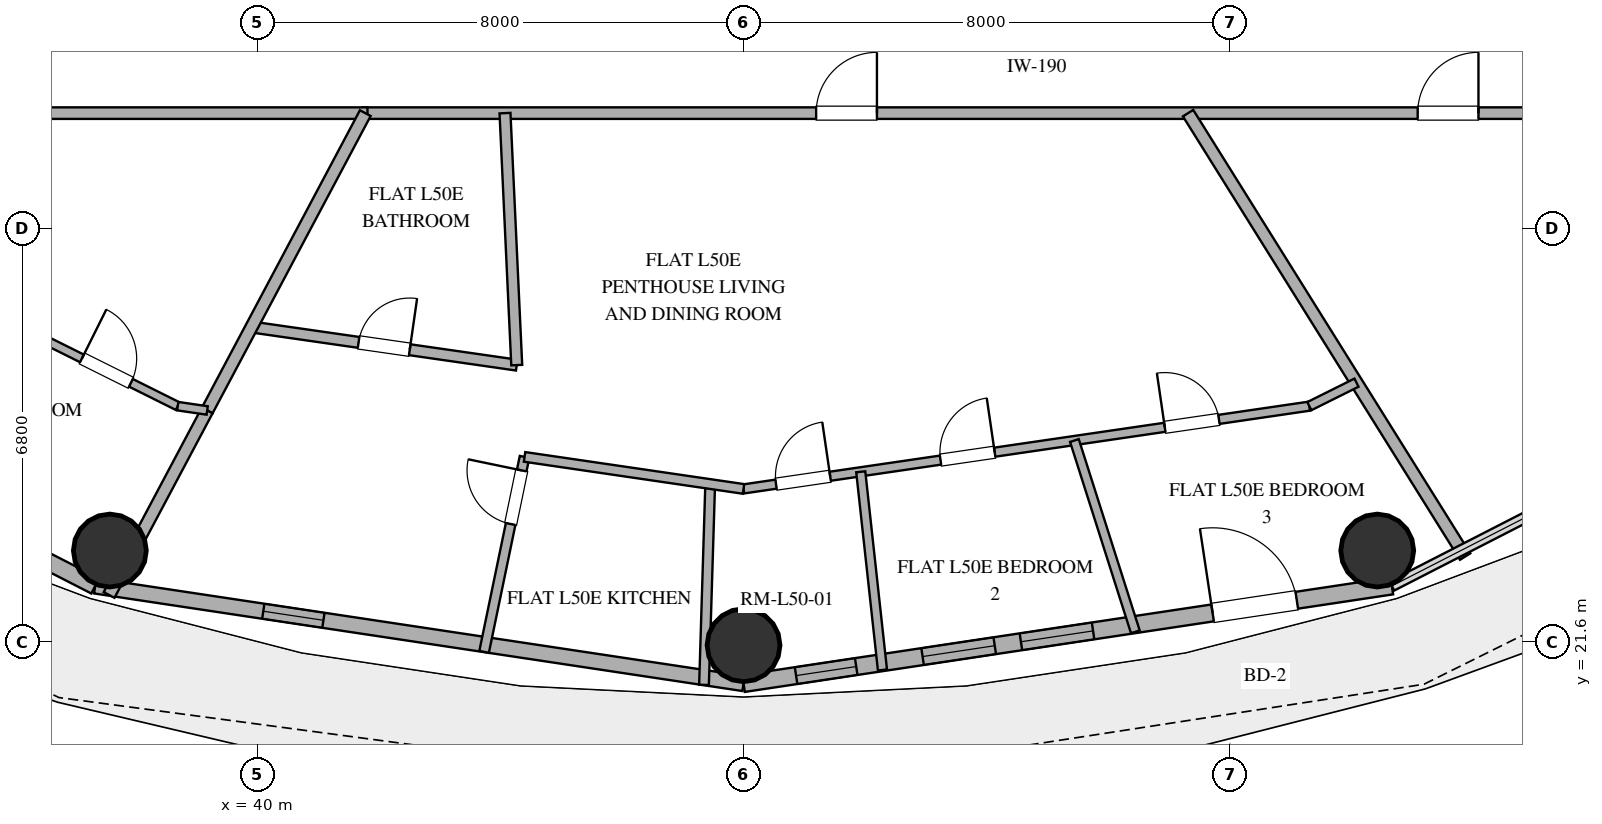
"""IFC4 building model, lengths in metres.
Left out: names, types, materials, properties, quantities, classifications, styles, units other than length and angle.
Written with IfcOpenShell. Run it as: python <this file> out.ifc"""

import sys

from ifc_helpers import new_model, si_unit, direction, frame, frame_2d, origin, origin_2d, place, context, subcontext, project, spatial, rectangle, hollow_circle, extrude, element, fill, save


model = new_model("IFC4")
c1 = context("Model", 3, precision=1e-05, world=origin(), true_north=direction((0.0, 1.0)))
c2 = subcontext(c1, "Body", "Model", "MODEL_VIEW")
j1 = project(units=[si_unit("LENGTHUNIT", "METRE"), si_unit("PLANEANGLEUNIT", "RADIAN")], contexts=[c1])
p1 = place(None, origin())
s1 = spatial("IfcSite", under=j1, at=p1, CompositionType="ELEMENT")
p2 = place(p1, origin())
s2 = spatial("IfcBuilding", under=s1, at=p2, CompositionType="ELEMENT")
p3 = place(p2, frame((0.0, 0.0, 197.4)))
s3 = spatial("IfcBuildingStorey", under=s2, at=p3, CompositionType="ELEMENT", Elevation=197.4)
for number, where, z_axis, x_axis in (
    (1, (37.578, 23.107, 0.0), (0.0, 0.0, 1.0), (1.0, 0.0, 0.0)),
    (2, (48.0, 21.55, 0.0), (0.0, 0.0, 1.0), (1.0, 0.0, 0.0)),
    (3, (58.422, 23.107, 0.0), (0.0, 0.0, 1.0), (1.0, 0.0, 0.0)),
):
    element("IfcColumn", number, at=place(p3, frame(where, z_axis=z_axis, x_axis=x_axis)), inside=s3, PredefinedType="COLUMN", context=c2, shape_type="SweptSolid", body=[
        extrude(hollow_circle(Radius=0.6, WallThickness=0.032, at=origin_2d()), origin(), (0.0, 0.0, 1.0), 3.25),
    ])
p4 = place(p3, frame((28.424, 27.094, 0.0), z_axis=(0.0, 0.0, 1.0), x_axis=(0.889872523182, -0.456209263919, 0.0)))
e4 = element("IfcWall", 4, at=p4, inside=s3, PredefinedType="SOLIDWALL", context=c2, shape_type="SweptSolid", body=[
    extrude(rectangle(XDim=10.016, YDim=0.28, at=frame_2d((5.008, 0.0))), origin(), (0.0, 0.0, 1.0), 3.25),
])
p5 = place(p4, frame((1.925, 0.0, 0.85)))
e5 = element("IfcOpeningElement", 5, at=p5, cuts=e4, PredefinedType="OPENING", context=c2, shape_type="SweptSolid", body=[
    extrude(rectangle(XDim=1.35, YDim=1.8, at=frame_2d((0.675, 0.9))), frame((0.0, 0.15, 0.0), z_axis=(0.0, -1.0, 0.0), x_axis=(1.0, 0.0, 0.0)), (0.0, 0.0, 1.0), 0.3),
])
p6 = place(p4, frame((4.795, 0.0, 0.85)))
e6 = element("IfcOpeningElement", 6, at=p6, cuts=e4, PredefinedType="OPENING", context=c2, shape_type="SweptSolid", body=[
    extrude(rectangle(XDim=1.2, YDim=1.8, at=frame_2d((0.6, 0.9))), frame((0.0, 0.15, 0.0), z_axis=(0.0, -1.0, 0.0), x_axis=(1.0, 0.0, 0.0)), (0.0, 0.0, 1.0), 0.3),
])
p7 = place(p4, frame((6.68, 0.0, 0.85)))
e7 = element("IfcOpeningElement", 7, at=p7, cuts=e4, PredefinedType="OPENING", context=c2, shape_type="SweptSolid", body=[
    extrude(rectangle(XDim=1.2, YDim=1.8, at=frame_2d((0.6, 0.9))), frame((0.0, 0.15, 0.0), z_axis=(0.0, -1.0, 0.0), x_axis=(1.0, 0.0, 0.0)), (0.0, 0.0, 1.0), 0.3),
])
p8 = place(p3, frame((37.337, 22.525, 0.0), z_axis=(0.0, 0.0, 1.0), x_axis=(0.988863993413, -0.148822049884, 0.0)))
e8 = element("IfcWall", 8, at=p8, inside=s3, PredefinedType="SOLIDWALL", context=c2, shape_type="SweptSolid", body=[
    extrude(rectangle(XDim=10.783, YDim=0.25, at=frame_2d((5.392, 0.0))), origin(), (0.0, 0.0, 1.0), 3.25),
])
p9 = place(p8, frame((2.796, 0.0, 1.42)))
e9 = element("IfcOpeningElement", 9, at=p9, cuts=e8, PredefinedType="OPENING", context=c2, shape_type="SweptSolid", body=[
    extrude(rectangle(XDim=1.0, YDim=1.05, at=frame_2d((0.5, 0.525))), frame((0.0, 0.135, 0.0), z_axis=(0.0, -1.0, 0.0), x_axis=(1.0, 0.0, 0.0)), (0.0, 0.0, 1.0), 0.27),
])
p10 = place(p3, frame((48.0, 20.92, 0.0), z_axis=(0.0, 0.0, 1.0), x_axis=(0.988863993413, 0.148822049884, 0.0)))
e10 = element("IfcWall", 10, at=p10, inside=s3, PredefinedType="SOLIDWALL", context=c2, shape_type="SweptSolid", body=[
    extrude(rectangle(XDim=10.783, YDim=0.28, at=frame_2d((5.392, 0.0))), origin(), (0.0, 0.0, 1.0), 3.25),
])
p11 = place(p10, frame((2.978, 0.0, 0.85)))
e11 = element("IfcOpeningElement", 11, at=p11, cuts=e10, PredefinedType="OPENING", context=c2, shape_type="SweptSolid", body=[
    extrude(rectangle(XDim=1.2, YDim=1.6, at=frame_2d((0.6, 0.8))), frame((0.0, 0.15, 0.0), z_axis=(0.0, -1.0, 0.0), x_axis=(1.0, 0.0, 0.0)), (0.0, 0.0, 1.0), 0.3),
])
p12 = place(p10, frame((4.613, 0.0, 0.85)))
e12 = element("IfcOpeningElement", 12, at=p12, cuts=e10, PredefinedType="OPENING", context=c2, shape_type="SweptSolid", body=[
    extrude(rectangle(XDim=1.2, YDim=1.6, at=frame_2d((0.6, 0.8))), frame((0.0, 0.15, 0.0), z_axis=(0.0, -1.0, 0.0), x_axis=(1.0, 0.0, 0.0)), (0.0, 0.0, 1.0), 0.3),
])
p13 = place(p10, frame((7.801, 0.0, 0.0)))
e13 = element("IfcOpeningElement", 13, at=p13, cuts=e10, PredefinedType="OPENING", context=c2, shape_type="SweptSolid", body=[
    extrude(rectangle(XDim=1.4, YDim=2.2, at=frame_2d((0.7, 1.1))), frame((0.0, 0.15, 0.0), z_axis=(0.0, -1.0, 0.0), x_axis=(1.0, 0.0, 0.0)), (0.0, 0.0, 1.0), 0.3),
])
p14 = place(p10, frame((0.874, 0.0, 0.85)))
e14 = element("IfcOpeningElement", 14, at=p14, cuts=e10, PredefinedType="OPENING", context=c2, shape_type="SweptSolid", body=[
    extrude(rectangle(XDim=1.0, YDim=1.8, at=frame_2d((0.5, 0.9))), frame((0.0, 0.15, 0.0), z_axis=(0.0, -1.0, 0.0), x_axis=(1.0, 0.0, 0.0)), (0.0, 0.0, 1.0), 0.3),
])
p15 = place(p3, frame((41.743, 30.3, 0.0), z_axis=(0.0, 0.0, 1.0), x_axis=(1.0, 0.0, 0.0)))
e15 = element("IfcWall", 15, at=p15, inside=s3, PredefinedType="PARTITIONING", context=c2, shape_type="SweptSolid", body=[
    extrude(rectangle(XDim=22.157, YDim=0.19, at=frame_2d((11.079, 0.0))), origin(), (0.0, 0.0, 1.0), 2.61),
])
p16 = place(p15, frame((7.451, 0.0, 0.0)))
e16 = element("IfcOpeningElement", 16, at=p16, cuts=e15, PredefinedType="OPENING", context=c2, shape_type="SweptSolid", body=[
    extrude(rectangle(XDim=1.0, YDim=2.2, at=frame_2d((0.5, 1.1))), frame((0.0, 0.105, 0.0), z_axis=(0.0, -1.0, 0.0), x_axis=(1.0, 0.0, 0.0)), (0.0, 0.0, 1.0), 0.21),
])
p17 = place(p15, frame((17.344, 0.0, 0.0)))
e17 = element("IfcOpeningElement", 17, at=p17, cuts=e15, PredefinedType="OPENING", context=c2, shape_type="SweptSolid", body=[
    extrude(rectangle(XDim=1.0, YDim=2.2, at=frame_2d((0.5, 1.1))), frame((0.0, 0.105, 0.0), z_axis=(0.0, -1.0, 0.0), x_axis=(1.0, 0.0, 0.0)), (0.0, 0.0, 1.0), 0.21),
])
p18 = place(p3, frame((41.815, 30.3, 0.0), z_axis=(0.0, 0.0, 1.0), x_axis=(-1.0, 0.0, 0.0)))
e18 = element("IfcWall", 18, at=p18, inside=s3, PredefinedType="PARTITIONING", context=c2, shape_type="SweptSolid", body=[
    extrude(rectangle(XDim=9.715, YDim=0.19, at=frame_2d((4.857, 0.0))), origin(), (0.0, 0.0, 1.0), 2.61),
])
p19 = place(p3, frame((59.868, 23.008, 0.0), z_axis=(0.0, 0.0, 1.0), x_axis=(-0.529914717401, 0.848050937315, 0.0)))
e19 = element("IfcWall", 19, at=p19, inside=s3, PredefinedType="PARTITIONING", context=c2, shape_type="SweptSolid", body=[
    extrude(rectangle(XDim=8.599, YDim=0.2, at=frame_2d((4.299, 0.0))), origin(), (0.0, 0.0, 1.0), 2.61),
])
p20 = place(p3, frame((39.909, 26.783, 0.0), z_axis=(0.0, 0.0, 1.0), x_axis=(0.989831677838, -0.142243627443, 0.0)))
e20 = element("IfcWall", 20, at=p20, inside=s3, PredefinedType="PLUMBINGWALL", context=c2, shape_type="SweptSolid", body=[
    extrude(rectangle(XDim=4.406, YDim=0.18, at=frame_2d((2.203, 0.0))), origin(), (0.0, 0.0, 1.0), 2.61),
])
p21 = place(p20, frame((1.778, 0.0, 0.0)))
e21 = element("IfcOpeningElement", 21, at=p21, cuts=e20, PredefinedType="OPENING", context=c2, shape_type="SweptSolid", body=[
    extrude(rectangle(XDim=0.85, YDim=2.1, at=frame_2d((0.425, 1.05))), frame((0.0, 0.1, 0.0), z_axis=(0.0, -1.0, 0.0), x_axis=(1.0, 0.0, 0.0)), (0.0, 0.0, 1.0), 0.2),
])
p22 = place(p3, frame((44.27, 26.156, 0.0), z_axis=(0.0, 0.0, 1.0), x_axis=(-0.046552902745, 0.998915825906, 0.0)))
e22 = element("IfcWall", 22, at=p22, inside=s3, PredefinedType="PLUMBINGWALL", context=c2, shape_type="SweptSolid", body=[
    extrude(rectangle(XDim=4.148, YDim=0.18, at=frame_2d((2.074, 0.0))), origin(), (0.0, 0.0, 1.0), 2.61),
])
p23 = place(p3, frame((39.179, 25.41, 0.0), z_axis=(0.0, 0.0, 1.0), x_axis=(0.469450659963, 0.88295870677, 0.0)))
e23 = element("IfcWall", 23, at=p23, inside=s3, PredefinedType="PARTITIONING", context=c2, shape_type="SweptSolid", body=[
    extrude(rectangle(XDim=5.538, YDim=0.2, at=frame_2d((2.769, 0.0))), origin(), (0.0, 0.0, 1.0), 2.61),
])
p24 = place(p3, frame((48.0, 24.12, 0.0), z_axis=(0.0, 0.0, 1.0), x_axis=(0.989474667704, 0.144706191892, 0.0)))
e24 = element("IfcWall", 24, at=p24, inside=s3, PredefinedType="PARTITIONING", context=c2, shape_type="SweptSolid", body=[
    extrude(rectangle(XDim=9.404, YDim=0.15, at=frame_2d((4.702, 0.0))), origin(), (0.0, 0.0, 1.0), 2.61),
])
p25 = place(p24, frame((7.002, 0.0, 0.0)))
e25 = element("IfcOpeningElement", 25, at=p25, cuts=e24, PredefinedType="OPENING", context=c2, shape_type="SweptSolid", body=[
    extrude(rectangle(XDim=0.9, YDim=2.1, at=frame_2d((0.45, 1.05))), frame((0.0, 0.085, 0.0), z_axis=(0.0, -1.0, 0.0), x_axis=(1.0, 0.0, 0.0)), (0.0, 0.0, 1.0), 0.17),
])
p26 = place(p24, frame((3.274, 0.0, 0.0)))
e26 = element("IfcOpeningElement", 26, at=p26, cuts=e24, PredefinedType="OPENING", context=c2, shape_type="SweptSolid", body=[
    extrude(rectangle(XDim=0.9, YDim=2.1, at=frame_2d((0.45, 1.05))), frame((0.0, 0.085, 0.0), z_axis=(0.0, -1.0, 0.0), x_axis=(1.0, 0.0, 0.0)), (0.0, 0.0, 1.0), 0.17),
])
p27 = place(p24, frame((0.54, 0.0, 0.0)))
e27 = element("IfcOpeningElement", 27, at=p27, cuts=e24, PredefinedType="OPENING", context=c2, shape_type="SweptSolid", body=[
    extrude(rectangle(XDim=0.9, YDim=2.1, at=frame_2d((0.45, 1.05))), frame((0.0, 0.085, 0.0), z_axis=(0.0, -1.0, 0.0), x_axis=(1.0, 0.0, 0.0)), (0.0, 0.0, 1.0), 0.17),
])
p28 = place(p3, frame((39.179, 25.41, 0.0), z_axis=(0.0, 0.0, 1.0), x_axis=(-0.469492799927, -0.882936300543, 0.0)))
e28 = element("IfcWall", 28, at=p28, inside=s3, PredefinedType="PARTITIONING", context=c2, shape_type="SweptSolid", body=[
    extrude(rectangle(XDim=3.437, YDim=0.2, at=frame_2d((1.718, 0.0))), origin(), (0.0, 0.0, 1.0), 2.61),
])
p29 = place(p3, frame((47.451, 24.2, 0.0), z_axis=(0.0, 0.0, 1.0), x_axis=(-0.03081032148, -0.999525249351, 0.0)))
e29 = element("IfcWall", 29, at=p29, inside=s3, PredefinedType="PLUMBINGWALL", context=c2, shape_type="SweptSolid", body=[
    extrude(rectangle(XDim=3.304, YDim=0.16, at=frame_2d((1.652, 0.0))), origin(), (0.0, 0.0, 1.0), 2.61),
])
p30 = place(p3, frame((53.442, 24.916, 0.0), z_axis=(0.0, 0.0, 1.0), x_axis=(0.303533258223, -0.952820844205, 0.0)))
e30 = element("IfcWall", 30, at=p30, inside=s3, PredefinedType="PARTITIONING", context=c2, shape_type="SweptSolid", body=[
    extrude(rectangle(XDim=3.302, YDim=0.15, at=frame_2d((1.651, 0.0))), origin(), (0.0, 0.0, 1.0), 2.61),
])
p31 = place(p3, frame((50.285, 21.143, 0.0), z_axis=(0.0, 0.0, 1.0), x_axis=(-0.108935832995, 0.994048783657, 0.0)))
e31 = element("IfcWall", 31, at=p31, inside=s3, PredefinedType="PARTITIONING", context=c2, shape_type="SweptSolid", body=[
    extrude(rectangle(XDim=3.279, YDim=0.15, at=frame_2d((1.639, 0.0))), origin(), (0.0, 0.0, 1.0), 2.61),
])
p32 = place(p3, frame((43.733, 21.441, 0.0), z_axis=(0.0, 0.0, 1.0), x_axis=(0.203194875639, 0.979138316334, 0.0)))
e32 = element("IfcWall", 32, at=p32, inside=s3, PredefinedType="PLUMBINGWALL", context=c2, shape_type="SweptSolid", body=[
    extrude(rectangle(XDim=3.274, YDim=0.16, at=frame_2d((1.637, 0.0))), origin(), (0.0, 0.0, 1.0), 2.61),
])
p33 = place(p32, frame((2.147, 0.0, 0.0)))
e33 = element("IfcOpeningElement", 33, at=p33, cuts=e32, PredefinedType="OPENING", context=c2, shape_type="SweptSolid", body=[
    extrude(rectangle(XDim=0.9, YDim=2.1, at=frame_2d((0.45, 1.05))), frame((0.0, 0.09, 0.0), z_axis=(0.0, -1.0, 0.0), x_axis=(1.0, 0.0, 0.0)), (0.0, 0.0, 1.0), 0.18),
])
p34 = place(p3, frame((44.398, 24.647, 0.0), z_axis=(0.0, 0.0, 1.0), x_axis=(0.989478635987, -0.144679054896, 0.0)))
e34 = element("IfcWall", 34, at=p34, inside=s3, PredefinedType="PLUMBINGWALL", context=c2, shape_type="SweptSolid", body=[
    extrude(rectangle(XDim=3.64, YDim=0.16, at=frame_2d((1.82, 0.0))), origin(), (0.0, 0.0, 1.0), 2.61),
])
p35 = place(p3, frame((36.349, 26.65, 0.0), z_axis=(0.0, 0.0, 1.0), x_axis=(0.895041110332, -0.445983644112, 0.0)))
e35 = element("IfcWall", 35, at=p35, inside=s3, PredefinedType="PARTITIONING", context=c2, shape_type="SweptSolid", body=[
    extrude(rectangle(XDim=2.621, YDim=0.14, at=frame_2d((1.311, 0.0))), origin(), (0.0, 0.0, 1.0), 2.61),
])
p36 = place(p35, frame((0.861, 0.0, 0.0)))
e36 = element("IfcOpeningElement", 36, at=p36, cuts=e35, PredefinedType="OPENING", context=c2, shape_type="SweptSolid", body=[
    extrude(rectangle(XDim=0.9, YDim=2.1, at=frame_2d((0.45, 1.05))), frame((0.0, 0.08, 0.0), z_axis=(0.0, -1.0, 0.0), x_axis=(1.0, 0.0, 0.0)), (0.0, 0.0, 1.0), 0.16),
])
p37 = place(p3, frame((57.305, 25.481, 0.0), z_axis=(0.0, 0.0, 1.0), x_axis=(0.895046131033, 0.445973567965, 0.0)))
e37 = element("IfcWall", 37, at=p37, inside=s3, PredefinedType="PARTITIONING", context=c2, shape_type="SweptSolid", body=[
    extrude(rectangle(XDim=0.867, YDim=0.15, at=frame_2d((0.433, 0.0))), origin(), (0.0, 0.0, 1.0), 2.61),
])
p38 = place(p3, frame((38.695, 25.481, 0.0), z_axis=(0.0, 0.0, 1.0), x_axis=(0.989485449351, -0.144632449754, 0.0)))
e38 = element("IfcWall", 38, at=p38, inside=s3, PredefinedType="PARTITIONING", context=c2, shape_type="SweptSolid", body=[
    extrude(rectangle(XDim=0.49, YDim=0.14, at=frame_2d((0.245, 0.0))), origin(), (0.0, 0.0, 1.0), 2.61),
])
p39 = place(p11, origin())
e39 = element("IfcWindow", 39, at=p39, inside=s3, PartitioningType="SINGLE_PANEL", PredefinedType="WINDOW", context=c2, shape_type="SweptSolid", body=[
    extrude(rectangle(XDim=1.2, YDim=1.6, at=frame_2d((0.6, 0.8))), frame((0.0, 0.03, 0.0), z_axis=(0.0, -1.0, 0.0), x_axis=(1.0, 0.0, 0.0)), (0.0, 0.0, 1.0), 0.06),
])
fill(e11, e39)
p40 = place(p12, origin())
e40 = element("IfcWindow", 40, at=p40, inside=s3, PartitioningType="SINGLE_PANEL", PredefinedType="WINDOW", context=c2, shape_type="SweptSolid", body=[
    extrude(rectangle(XDim=1.2, YDim=1.6, at=frame_2d((0.6, 0.8))), frame((0.0, 0.03, 0.0), z_axis=(0.0, -1.0, 0.0), x_axis=(1.0, 0.0, 0.0)), (0.0, 0.0, 1.0), 0.06),
])
fill(e12, e40)
p41 = place(p13, origin())
e41 = element("IfcDoor", 41, at=p41, inside=s3, OperationType="SINGLE_SWING_LEFT", PredefinedType="DOOR", context=c2, shape_type="SweptSolid", body=[
    extrude(rectangle(XDim=1.4, YDim=2.2, at=frame_2d((0.7, 1.1))), frame((0.0, 0.025, 0.0), z_axis=(0.0, -1.0, 0.0), x_axis=(1.0, 0.0, 0.0)), (0.0, 0.0, 1.0), 0.05),
])
fill(e13, e41)
p42 = place(p9, origin())
e42 = element("IfcWindow", 42, at=p42, inside=s3, PartitioningType="SINGLE_PANEL", PredefinedType="WINDOW", context=c2, shape_type="SweptSolid", body=[
    extrude(rectangle(XDim=1.0, YDim=1.05, at=frame_2d((0.5, 0.525))), frame((0.0, 0.03, 0.0), z_axis=(0.0, -1.0, 0.0), x_axis=(1.0, 0.0, 0.0)), (0.0, 0.0, 1.0), 0.06),
])
fill(e9, e42)
p43 = place(p14, origin())
e43 = element("IfcWindow", 43, at=p43, inside=s3, PartitioningType="SINGLE_PANEL", PredefinedType="WINDOW", context=c2, shape_type="SweptSolid", body=[
    extrude(rectangle(XDim=1.0, YDim=1.8, at=frame_2d((0.5, 0.9))), frame((0.0, 0.03, 0.0), z_axis=(0.0, -1.0, 0.0), x_axis=(1.0, 0.0, 0.0)), (0.0, 0.0, 1.0), 0.06),
])
fill(e14, e43)
p44 = place(p16, origin())
e44 = element("IfcDoor", 44, at=p44, inside=s3, OperationType="SINGLE_SWING_RIGHT", PredefinedType="DOOR", context=c2, shape_type="SweptSolid", body=[
    extrude(rectangle(XDim=1.0, YDim=2.2, at=frame_2d((0.5, 1.1))), frame((0.0, 0.025, 0.0), z_axis=(0.0, -1.0, 0.0), x_axis=(1.0, 0.0, 0.0)), (0.0, 0.0, 1.0), 0.05),
])
fill(e16, e44)
p45 = place(p17, origin())
e45 = element("IfcDoor", 45, at=p45, inside=s3, OperationType="SINGLE_SWING_RIGHT", PredefinedType="DOOR", context=c2, shape_type="SweptSolid", body=[
    extrude(rectangle(XDim=1.0, YDim=2.2, at=frame_2d((0.5, 1.1))), frame((0.0, 0.025, 0.0), z_axis=(0.0, -1.0, 0.0), x_axis=(1.0, 0.0, 0.0)), (0.0, 0.0, 1.0), 0.05),
])
fill(e17, e45)
p46 = place(p21, origin())
e46 = element("IfcDoor", 46, at=p46, inside=s3, OperationType="SINGLE_SWING_RIGHT", PredefinedType="DOOR", context=c2, shape_type="SweptSolid", body=[
    extrude(rectangle(XDim=0.85, YDim=2.1, at=frame_2d((0.425, 1.05))), frame((0.0, 0.025, 0.0), z_axis=(0.0, -1.0, 0.0), x_axis=(1.0, 0.0, 0.0)), (0.0, 0.0, 1.0), 0.05),
])
fill(e21, e46)
p47 = place(p25, origin())
e47 = element("IfcDoor", 47, at=p47, inside=s3, OperationType="SINGLE_SWING_LEFT", PredefinedType="DOOR", context=c2, shape_type="SweptSolid", body=[
    extrude(rectangle(XDim=0.9, YDim=2.1, at=frame_2d((0.45, 1.05))), frame((0.0, 0.025, 0.0), z_axis=(0.0, -1.0, 0.0), x_axis=(1.0, 0.0, 0.0)), (0.0, 0.0, 1.0), 0.05),
])
fill(e25, e47)
p48 = place(p26, origin())
e48 = element("IfcDoor", 48, at=p48, inside=s3, OperationType="SINGLE_SWING_RIGHT", PredefinedType="DOOR", context=c2, shape_type="SweptSolid", body=[
    extrude(rectangle(XDim=0.9, YDim=2.1, at=frame_2d((0.45, 1.05))), frame((0.0, 0.025, 0.0), z_axis=(0.0, -1.0, 0.0), x_axis=(1.0, 0.0, 0.0)), (0.0, 0.0, 1.0), 0.05),
])
fill(e26, e48)
p49 = place(p27, origin())
e49 = element("IfcDoor", 49, at=p49, inside=s3, OperationType="SINGLE_SWING_RIGHT", PredefinedType="DOOR", context=c2, shape_type="SweptSolid", body=[
    extrude(rectangle(XDim=0.9, YDim=2.1, at=frame_2d((0.45, 1.05))), frame((0.0, 0.025, 0.0), z_axis=(0.0, -1.0, 0.0), x_axis=(1.0, 0.0, 0.0)), (0.0, 0.0, 1.0), 0.05),
])
fill(e27, e49)
p50 = place(p33, origin())
e50 = element("IfcDoor", 50, at=p50, inside=s3, OperationType="SINGLE_SWING_RIGHT", PredefinedType="DOOR", context=c2, shape_type="SweptSolid", body=[
    extrude(rectangle(XDim=0.9, YDim=2.1, at=frame_2d((0.45, 1.05))), frame((0.0, 0.025, 0.0), z_axis=(0.0, -1.0, 0.0), x_axis=(1.0, 0.0, 0.0)), (0.0, 0.0, 1.0), 0.05),
])
fill(e33, e50)
p51 = place(p36, origin())
e51 = element("IfcDoor", 51, at=p51, inside=s3, OperationType="SINGLE_SWING_LEFT", PredefinedType="DOOR", context=c2, shape_type="SweptSolid", body=[
    extrude(rectangle(XDim=0.9, YDim=2.1, at=frame_2d((0.45, 1.05))), frame((0.0, 0.025, 0.0), z_axis=(0.0, -1.0, 0.0), x_axis=(1.0, 0.0, 0.0)), (0.0, 0.0, 1.0), 0.05),
])
fill(e36, e51)
save(model, sys.argv[1])
